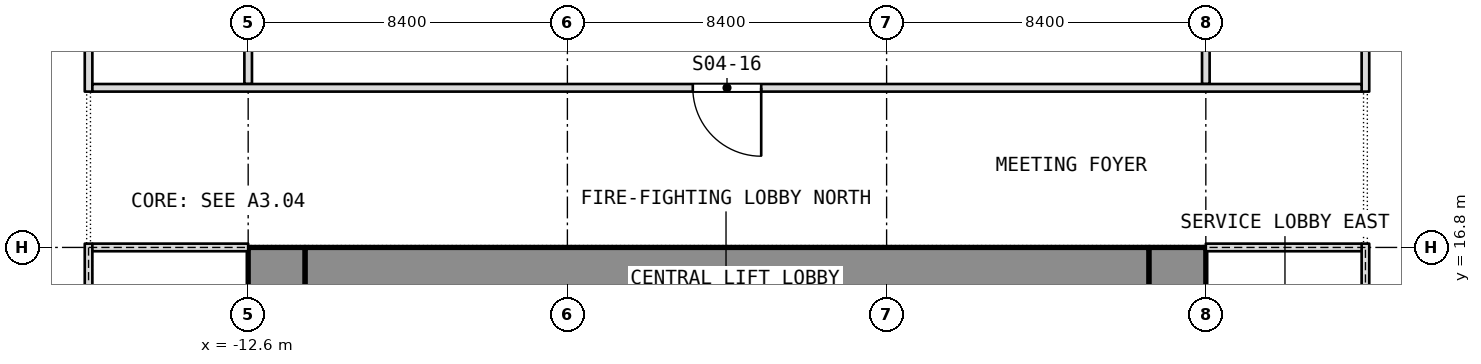
"""IFC4 building model, lengths in metres.
Left out: names, types, materials, properties, quantities, classifications, styles, units other than length and angle.
Written with IfcOpenShell. Run it as: python <this file> out.ifc"""

import sys

from ifc_helpers import new_model, si_unit, direction, frame, frame_2d, origin, place, context, subcontext, project, spatial, rectangle, extrude, element, fill, save


model = new_model("IFC4")
c1 = context("Model", 3, precision=1e-05, world=origin(), true_north=direction((0.0, 1.0)))
c2 = subcontext(c1, "Body", "Model", "MODEL_VIEW")
j1 = project(units=[si_unit("LENGTHUNIT", "METRE"), si_unit("PLANEANGLEUNIT", "RADIAN")], contexts=[c1])
p1 = place(None, origin())
s1 = spatial("IfcSite", under=j1, at=p1, CompositionType="ELEMENT")
p2 = place(p1, origin())
s2 = spatial("IfcBuilding", under=s1, at=p2, CompositionType="ELEMENT")
p3 = place(p2, frame((0.0, 0.0, 21.0)))
s3 = spatial("IfcBuildingStorey", under=s2, at=p3, CompositionType="ELEMENT", Elevation=21.0)
p4 = place(p3, frame((11.85, 0.0, 0.0), z_axis=(0.0, 0.0, 1.0), x_axis=(0.0, 1.0, 0.0)))
e1 = element("IfcWall", 1, at=p4, inside=s3, PredefinedType="SHEAR", context=c2, shape_type="SweptSolid", body=[
    extrude(rectangle(XDim=16.8, YDim=1.5, at=frame_2d((8.4, 0.0))), origin(), (0.0, 0.0, 1.0), 5.0),
])
p5 = place(p4, frame((1.762, 0.0, 0.0)))
e2 = element("IfcOpeningElement", 2, at=p5, cuts=e1, PredefinedType="OPENING", context=c2, shape_type="SweptSolid", body=[
    extrude(rectangle(XDim=0.9, YDim=2.1, at=frame_2d((0.45, 1.05))), frame((0.0, 0.75, 0.0), z_axis=(0.0, -1.0, 0.0), x_axis=(1.0, 0.0, 0.0)), (0.0, 0.0, 1.0), 1.5),
])
p6 = place(p4, frame((4.387, 0.0, 0.0)))
e3 = element("IfcOpeningElement", 3, at=p6, cuts=e1, PredefinedType="OPENING", context=c2, shape_type="SweptSolid", body=[
    extrude(rectangle(XDim=0.9, YDim=2.1, at=frame_2d((0.45, 1.05))), frame((0.0, 0.75, 0.0), z_axis=(0.0, -1.0, 0.0), x_axis=(1.0, 0.0, 0.0)), (0.0, 0.0, 1.0), 1.5),
])
p7 = place(p4, frame((6.825, 0.0, 0.0)))
e4 = element("IfcOpeningElement", 4, at=p7, cuts=e1, PredefinedType="OPENING", context=c2, shape_type="SweptSolid", body=[
    extrude(rectangle(XDim=1.2, YDim=2.1, at=frame_2d((0.6, 1.05))), frame((0.0, 0.75, 0.0), z_axis=(0.0, -1.0, 0.0), x_axis=(1.0, 0.0, 0.0)), (0.0, 0.0, 1.0), 1.5),
])
p8 = place(p4, frame((14.137, 0.0, 0.0)))
e5 = element("IfcOpeningElement", 5, at=p8, cuts=e1, PredefinedType="OPENING", context=c2, shape_type="SweptSolid", body=[
    extrude(rectangle(XDim=0.9, YDim=2.1, at=frame_2d((0.45, 1.05))), frame((0.0, 0.75, 0.0), z_axis=(0.0, -1.0, 0.0), x_axis=(1.0, 0.0, 0.0)), (0.0, 0.0, 1.0), 1.5),
])
p9 = place(p4, frame((11.512, 0.0, 0.0)))
e6 = element("IfcOpeningElement", 6, at=p9, cuts=e1, PredefinedType="OPENING", context=c2, shape_type="SweptSolid", body=[
    extrude(rectangle(XDim=0.9, YDim=2.1, at=frame_2d((0.45, 1.05))), frame((0.0, 0.75, 0.0), z_axis=(0.0, -1.0, 0.0), x_axis=(1.0, 0.0, 0.0)), (0.0, 0.0, 1.0), 1.5),
])
p10 = place(p4, frame((8.775, 0.0, 0.0)))
e7 = element("IfcOpeningElement", 7, at=p10, cuts=e1, PredefinedType="OPENING", context=c2, shape_type="SweptSolid", body=[
    extrude(rectangle(XDim=1.2, YDim=2.1, at=frame_2d((0.6, 1.05))), frame((0.0, 0.75, 0.0), z_axis=(0.0, -1.0, 0.0), x_axis=(1.0, 0.0, 0.0)), (0.0, 0.0, 1.0), 1.5),
])
p11 = place(p3, frame((-11.85, 0.0, 0.0), z_axis=(0.0, 0.0, 1.0), x_axis=(0.0, 1.0, 0.0)))
e8 = element("IfcWall", 8, at=p11, inside=s3, PredefinedType="SHEAR", context=c2, shape_type="SweptSolid", body=[
    extrude(rectangle(XDim=16.8, YDim=1.5, at=frame_2d((8.4, 0.0))), origin(), (0.0, 0.0, 1.0), 5.0),
])
p12 = place(p11, frame((2.3, 0.0, 0.0)))
e9 = element("IfcOpeningElement", 9, at=p12, cuts=e8, PredefinedType="OPENING", context=c2, shape_type="SweptSolid", body=[
    extrude(rectangle(XDim=1.1, YDim=2.1, at=frame_2d((0.55, 1.05))), frame((0.0, 0.75, 0.0), z_axis=(0.0, -1.0, 0.0), x_axis=(1.0, 0.0, 0.0)), (0.0, 0.0, 1.0), 1.5),
])
p13 = place(p11, frame((4.85, 0.0, 0.0)))
e10 = element("IfcOpeningElement", 10, at=p13, cuts=e8, PredefinedType="OPENING", context=c2, shape_type="SweptSolid", body=[
    extrude(rectangle(XDim=1.1, YDim=2.1, at=frame_2d((0.55, 1.05))), frame((0.0, 0.75, 0.0), z_axis=(0.0, -1.0, 0.0), x_axis=(1.0, 0.0, 0.0)), (0.0, 0.0, 1.0), 1.5),
])
p14 = place(p11, frame((6.825, 0.0, 0.0)))
e11 = element("IfcOpeningElement", 11, at=p14, cuts=e8, PredefinedType="OPENING", context=c2, shape_type="SweptSolid", body=[
    extrude(rectangle(XDim=1.2, YDim=2.1, at=frame_2d((0.6, 1.05))), frame((0.0, 0.75, 0.0), z_axis=(0.0, -1.0, 0.0), x_axis=(1.0, 0.0, 0.0)), (0.0, 0.0, 1.0), 1.5),
])
p15 = place(p11, frame((13.4, 0.0, 0.0)))
e12 = element("IfcOpeningElement", 12, at=p15, cuts=e8, PredefinedType="OPENING", context=c2, shape_type="SweptSolid", body=[
    extrude(rectangle(XDim=1.1, YDim=2.1, at=frame_2d((0.55, 1.05))), frame((0.0, 0.75, 0.0), z_axis=(0.0, -1.0, 0.0), x_axis=(1.0, 0.0, 0.0)), (0.0, 0.0, 1.0), 1.5),
])
p16 = place(p11, frame((10.85, 0.0, 0.0)))
e13 = element("IfcOpeningElement", 13, at=p16, cuts=e8, PredefinedType="OPENING", context=c2, shape_type="SweptSolid", body=[
    extrude(rectangle(XDim=1.1, YDim=2.1, at=frame_2d((0.55, 1.05))), frame((0.0, 0.75, 0.0), z_axis=(0.0, -1.0, 0.0), x_axis=(1.0, 0.0, 0.0)), (0.0, 0.0, 1.0), 1.5),
])
p17 = place(p11, frame((8.775, 0.0, 0.0)))
e14 = element("IfcOpeningElement", 14, at=p17, cuts=e8, PredefinedType="OPENING", context=c2, shape_type="SweptSolid", body=[
    extrude(rectangle(XDim=1.2, YDim=2.1, at=frame_2d((0.6, 1.05))), frame((0.0, 0.75, 0.0), z_axis=(0.0, -1.0, 0.0), x_axis=(1.0, 0.0, 0.0)), (0.0, 0.0, 1.0), 1.5),
])
p18 = place(p3, frame((-11.1, 16.05, 0.0), z_axis=(0.0, 0.0, 1.0), x_axis=(1.0, 0.0, 0.0)))
e15 = element("IfcWall", 15, at=p18, inside=s3, PredefinedType="SHEAR", context=c2, shape_type="SweptSolid", body=[
    extrude(rectangle(XDim=22.2, YDim=1.5, at=frame_2d((11.1, 0.0))), origin(), (0.0, 0.0, 1.0), 5.0),
])
p19 = place(p3, frame((16.8, 20.9, 0.0), z_axis=(0.0, 0.0, 1.0), x_axis=(0.0, 1.0, 0.0)))
e16 = element("IfcWall", 16, at=p19, inside=s3, PredefinedType="PARTITIONING", context=c2, shape_type="SweptSolid", body=[
    extrude(rectangle(XDim=15.0, YDim=0.2, at=frame_2d((7.5, 0.0))), origin(), (0.0, 0.0, 1.0), 4.68),
])
p20 = place(p19, frame((3.0, 0.0, 0.0)))
e17 = element("IfcOpeningElement", 17, at=p20, cuts=e16, PredefinedType="OPENING", context=c2, shape_type="SweptSolid", body=[
    extrude(rectangle(XDim=1.0, YDim=2.1, at=frame_2d((0.5, 1.05))), frame((0.0, 0.1, 0.0), z_axis=(0.0, -1.0, 0.0), x_axis=(1.0, 0.0, 0.0)), (0.0, 0.0, 1.0), 0.2),
])
for number, where, z_axis, x_axis in (
    (18, (12.6, 21.1, 0.0), (0.0, 0.0, 1.0), (0.0, 1.0, 0.0)),
    (19, (-12.6, 21.1, 0.0), (0.0, 0.0, 1.0), (0.0, 1.0, 0.0)),
):
    element("IfcWall", number, at=place(p3, frame(where, z_axis=z_axis, x_axis=x_axis)), inside=s3, PredefinedType="PARTITIONING", context=c2, shape_type="SweptSolid", body=[
        extrude(rectangle(XDim=11.033, YDim=0.2, at=frame_2d((5.517, 0.0))), origin(), (0.0, 0.0, 1.0), 4.68),
    ])
p21 = place(p3, frame((-16.8, 20.9, 0.0), z_axis=(0.0, 0.0, 1.0), x_axis=(0.0, 1.0, 0.0)))
e20 = element("IfcWall", 20, at=p21, inside=s3, PredefinedType="PARTITIONING", context=c2, shape_type="SweptSolid", body=[
    extrude(rectangle(XDim=13.8, YDim=0.2, at=frame_2d((6.9, 0.0))), origin(), (0.0, 0.0, 1.0), 4.68),
])
p22 = place(p21, frame((2.5, 0.0, 0.0)))
e21 = element("IfcOpeningElement", 21, at=p22, cuts=e20, PredefinedType="OPENING", context=c2, shape_type="SweptSolid", body=[
    extrude(rectangle(XDim=1.0, YDim=2.1, at=frame_2d((0.5, 1.05))), frame((0.0, 0.1, 0.0), z_axis=(0.0, -1.0, 0.0), x_axis=(1.0, 0.0, 0.0)), (0.0, 0.0, 1.0), 0.2),
])
p23 = place(p3, frame((-16.7, 21.0, 0.0), z_axis=(0.0, 0.0, 1.0), x_axis=(1.0, 0.0, 0.0)))
e22 = element("IfcWall", 22, at=p23, inside=s3, PredefinedType="PARTITIONING", context=c2, shape_type="SweptSolid", body=[
    extrude(rectangle(XDim=33.4, YDim=0.2, at=frame_2d((16.7, 0.0))), origin(), (0.0, 0.0, 1.0), 4.68),
])
p24 = place(p23, frame((15.8, 0.0, 0.0)))
e23 = element("IfcOpeningElement", 23, at=p24, cuts=e22, PredefinedType="OPENING", context=c2, shape_type="SweptSolid", body=[
    extrude(rectangle(XDim=1.8, YDim=2.1, at=frame_2d((0.9, 1.05))), frame((0.0, 0.1, 0.0), z_axis=(0.0, -1.0, 0.0), x_axis=(1.0, 0.0, 0.0)), (0.0, 0.0, 1.0), 0.2),
])
p25 = place(p3, frame((-16.8, -0.1, 0.0), z_axis=(0.0, 0.0, 1.0), x_axis=(0.0, 1.0, 0.0)))
e24 = element("IfcWall", 24, at=p25, inside=s3, PredefinedType="PARTITIONING", context=c2, shape_type="SweptSolid", body=[
    extrude(rectangle(XDim=17.0, YDim=0.2, at=frame_2d((8.5, 0.0))), origin(), (0.0, 0.0, 1.0), 4.78),
])
p26 = place(p25, frame((1.9, 0.0, 0.0)))
e25 = element("IfcOpeningElement", 25, at=p26, cuts=e24, PredefinedType="OPENING", context=c2, shape_type="SweptSolid", body=[
    extrude(rectangle(XDim=2.4, YDim=2.1, at=frame_2d((1.2, 1.05))), frame((0.0, 0.1, 0.0), z_axis=(0.0, -1.0, 0.0), x_axis=(1.0, 0.0, 0.0)), (0.0, 0.0, 1.0), 0.2),
])
p27 = place(p25, frame((12.7, 0.0, 0.0)))
e26 = element("IfcOpeningElement", 26, at=p27, cuts=e24, PredefinedType="OPENING", context=c2, shape_type="SweptSolid", body=[
    extrude(rectangle(XDim=2.4, YDim=2.1, at=frame_2d((1.2, 1.05))), frame((0.0, 0.1, 0.0), z_axis=(0.0, -1.0, 0.0), x_axis=(1.0, 0.0, 0.0)), (0.0, 0.0, 1.0), 0.2),
])
p28 = place(p3, frame((-16.7, 16.8, 0.0), z_axis=(0.0, 0.0, 1.0), x_axis=(1.0, 0.0, 0.0)))
e27 = element("IfcWall", 27, at=p28, inside=s3, PredefinedType="PARTITIONING", context=c2, shape_type="SweptSolid", body=[
    extrude(rectangle(XDim=4.1, YDim=0.2, at=frame_2d((2.05, 0.0))), origin(), (0.0, 0.0, 1.0), 4.78),
])
p29 = place(p3, frame((16.8, -0.1, 0.0), z_axis=(0.0, 0.0, 1.0), x_axis=(0.0, 1.0, 0.0)))
e28 = element("IfcWall", 28, at=p29, inside=s3, PredefinedType="PARTITIONING", context=c2, shape_type="SweptSolid", body=[
    extrude(rectangle(XDim=17.0, YDim=0.2, at=frame_2d((8.5, 0.0))), origin(), (0.0, 0.0, 1.0), 4.78),
])
p30 = place(p29, frame((1.9, 0.0, 0.0)))
e29 = element("IfcOpeningElement", 29, at=p30, cuts=e28, PredefinedType="OPENING", context=c2, shape_type="SweptSolid", body=[
    extrude(rectangle(XDim=2.4, YDim=2.1, at=frame_2d((1.2, 1.05))), frame((0.0, 0.1, 0.0), z_axis=(0.0, -1.0, 0.0), x_axis=(1.0, 0.0, 0.0)), (0.0, 0.0, 1.0), 0.2),
])
p31 = place(p29, frame((12.7, 0.0, 0.0)))
e30 = element("IfcOpeningElement", 30, at=p31, cuts=e28, PredefinedType="OPENING", context=c2, shape_type="SweptSolid", body=[
    extrude(rectangle(XDim=2.4, YDim=2.1, at=frame_2d((1.2, 1.05))), frame((0.0, 0.1, 0.0), z_axis=(0.0, -1.0, 0.0), x_axis=(1.0, 0.0, 0.0)), (0.0, 0.0, 1.0), 0.2),
])
p32 = place(p3, frame((12.6, 16.8, 0.0), z_axis=(0.0, 0.0, 1.0), x_axis=(1.0, 0.0, 0.0)))
e31 = element("IfcWall", 31, at=p32, inside=s3, PredefinedType="PARTITIONING", context=c2, shape_type="SweptSolid", body=[
    extrude(rectangle(XDim=4.1, YDim=0.2, at=frame_2d((2.05, 0.0))), origin(), (0.0, 0.0, 1.0), 4.78),
])
p33 = place(p24, origin())
e32 = element("IfcDoor", 32, at=p33, inside=s3, OperationType="DOUBLE_DOOR_SINGLE_SWING", PredefinedType="DOOR", context=c2, shape_type="SweptSolid", body=[
    extrude(rectangle(XDim=1.8, YDim=2.1, at=frame_2d((0.9, 1.05))), frame((0.0, 0.025, 0.0), z_axis=(0.0, -1.0, 0.0), x_axis=(1.0, 0.0, 0.0)), (0.0, 0.0, 1.0), 0.05),
])
fill(e23, e32)
save(model, sys.argv[1])
